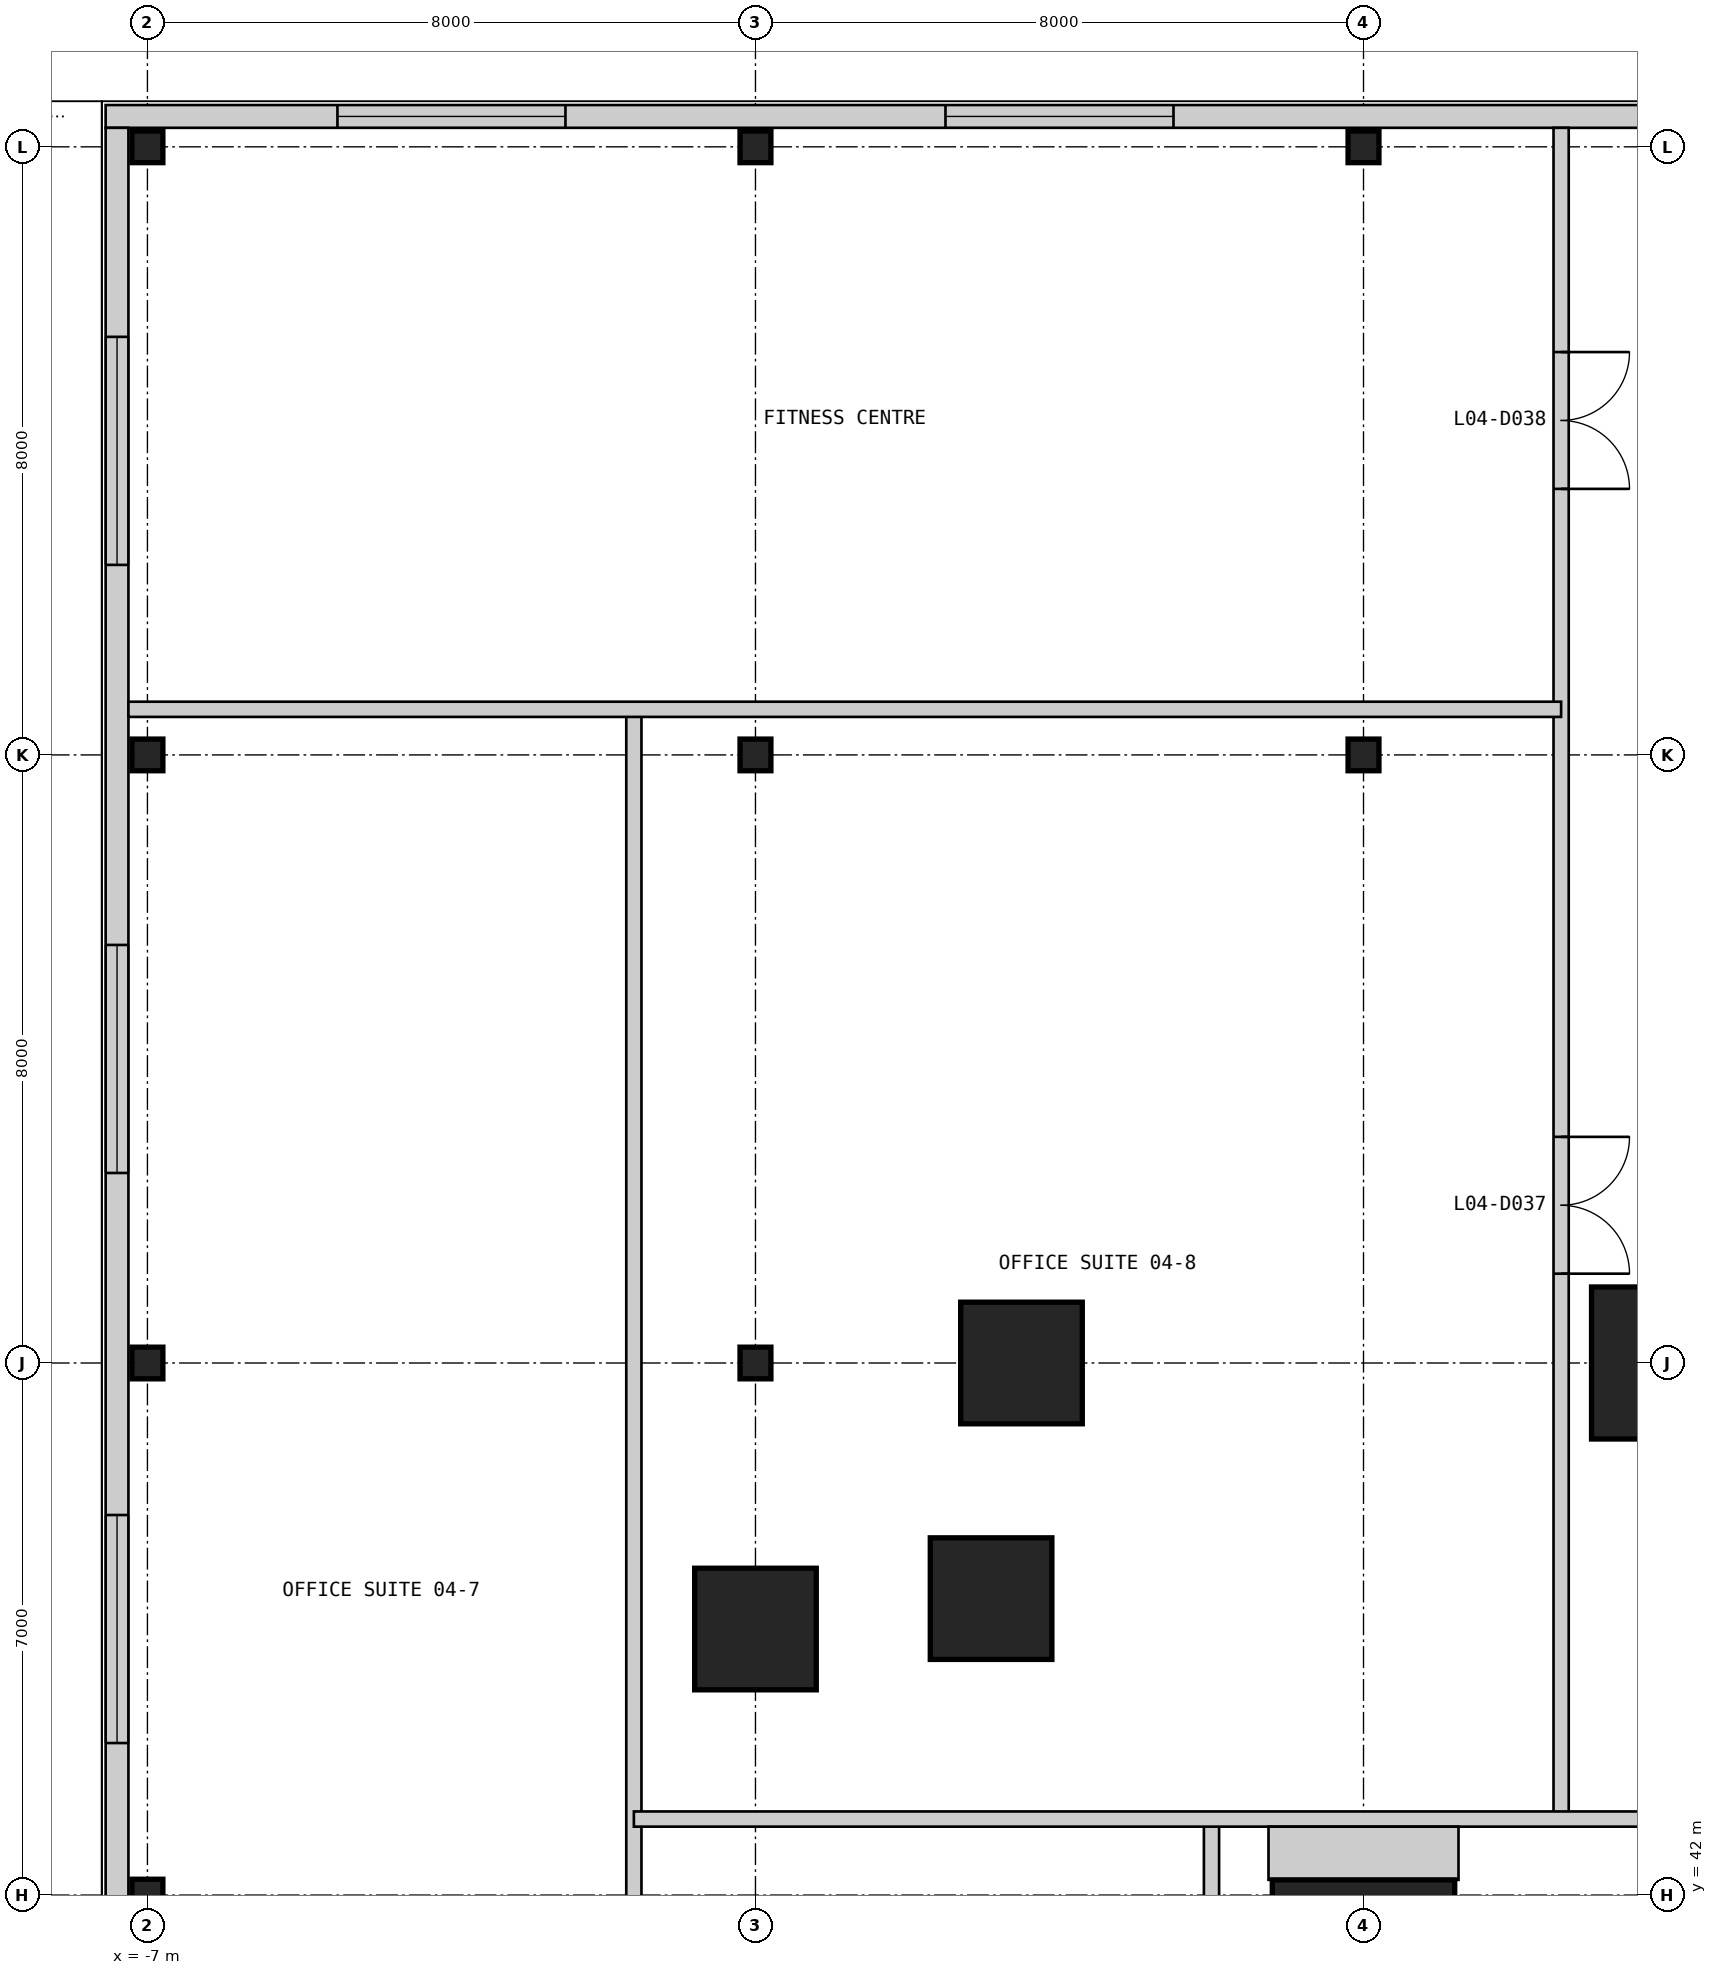
"""IFC4 building model, lengths in metres.
Left out: names, types, materials, properties, quantities, classifications, styles, units other than length and angle.
Written with IfcOpenShell. Run it as: python <this file> out.ifc"""

import sys

from ifc_helpers import new_model, si_unit, direction, frame, frame_2d, origin, origin_2d, place, context, subcontext, project, spatial, rectangle, i_section, extrude, element, fill, save


model = new_model("IFC4")
c1 = context("Model", 3, precision=1e-05, world=origin(), true_north=direction((0.0, 1.0)))
c2 = subcontext(c1, "Body", "Model", "MODEL_VIEW")
j1 = project(units=[si_unit("LENGTHUNIT", "METRE"), si_unit("PLANEANGLEUNIT", "RADIAN")], contexts=[c1])
p1 = place(None, origin())
s1 = spatial("IfcSite", under=j1, at=p1, CompositionType="ELEMENT")
p2 = place(p1, origin())
s2 = spatial("IfcBuilding", under=s1, at=p2, CompositionType="ELEMENT")
p3 = place(p2, frame((0.0, 0.0, 21.4)))
s3 = spatial("IfcBuildingStorey", under=s2, at=p3, CompositionType="ELEMENT", Elevation=21.4)
p4 = place(p3, frame((9.0, 41.0, 0.0), z_axis=(0.0, 0.0, 1.0), x_axis=(1.0, 0.0, 0.0)))
e1 = element("IfcColumn", 1, at=p4, inside=s3, PredefinedType="COLUMN", context=c2, shape_type="SweptSolid", body=[
    extrude(rectangle(XDim=2.4, YDim=2.4, at=origin_2d()), origin(), (0.0, 0.0, 1.0), 4.8),
])
p5 = place(p3, frame((13.0, 49.0, 0.0), z_axis=(0.0, 0.0, 1.0), x_axis=(1.0, 0.0, 0.0)))
e2 = element("IfcColumn", 2, at=p5, inside=s3, PredefinedType="COLUMN", context=c2, shape_type="SweptSolid", body=[
    extrude(rectangle(XDim=2.0, YDim=2.0, at=origin_2d()), origin(), (0.0, 0.0, 1.0), 4.8),
])
for number, where, z_axis, x_axis in (
    (3, (4.5, 49.0, 0.0), (0.0, 0.0, 1.0), (1.0, 0.0, 0.0)),
    (4, (4.1, 45.9, 0.0), (0.0, 0.0, 1.0), (1.0, 0.0, 0.0)),
    (5, (1.0, 45.5, 0.0), (0.0, 0.0, 1.0), (1.0, 0.0, 0.0)),
):
    element("IfcColumn", number, at=place(p3, frame(where, z_axis=z_axis, x_axis=x_axis)), inside=s3, PredefinedType="COLUMN", context=c2, shape_type="SweptSolid", body=[
        extrude(rectangle(XDim=1.6, YDim=1.6, at=origin_2d()), origin(), (0.0, 0.0, 1.0), 4.8),
    ])
for number, where, z_axis, x_axis in (
    (6, (-7.0, 42.0, 0.0), (0.0, 0.0, 1.0), (1.0, 0.0, 0.0)),
    (7, (-7.0, 49.0, 0.0), (0.0, 0.0, 1.0), (1.0, 0.0, 0.0)),
    (8, (-7.0, 57.0, 0.0), (0.0, 0.0, 1.0), (1.0, 0.0, 0.0)),
    (9, (-7.0, 65.0, 0.0), (0.0, 0.0, 1.0), (1.0, 0.0, 0.0)),
    (10, (1.0, 49.0, 0.0), (0.0, 0.0, 1.0), (1.0, 0.0, 0.0)),
    (11, (1.0, 57.0, 0.0), (0.0, 0.0, 1.0), (1.0, 0.0, 0.0)),
    (12, (1.0, 65.0, 0.0), (0.0, 0.0, 1.0), (1.0, 0.0, 0.0)),
    (13, (9.0, 57.0, 0.0), (0.0, 0.0, 1.0), (1.0, 0.0, 0.0)),
    (14, (9.0, 65.0, 0.0), (0.0, 0.0, 1.0), (1.0, 0.0, 0.0)),
):
    element("IfcColumn", number, at=place(p3, frame(where, z_axis=z_axis, x_axis=x_axis)), inside=s3, PredefinedType="COLUMN", context=c2, shape_type="SweptSolid", body=[
        extrude(i_section(OverallWidth=0.406, OverallDepth=0.417, WebThickness=0.03, FlangeThickness=0.048, at=origin_2d()), origin(), (0.0, 0.0, 1.0), 4.8),
    ])
p6 = place(p3, frame((57.55, 65.4, 0.0), z_axis=(0.0, 0.0, 1.0), x_axis=(-1.0, 0.0, 0.0)))
e15 = element("IfcWall", 15, at=p6, inside=s3, PredefinedType="SOLIDWALL", context=c2, shape_type="SweptSolid", body=[
    extrude(rectangle(XDim=65.1, YDim=0.3, at=frame_2d((32.55, 0.0))), origin(), (0.0, 0.0, 1.0), 4.5),
])
p7 = place(p6, frame((59.05, 0.0, 0.9)))
e16 = element("IfcOpeningElement", 16, at=p7, cuts=e15, PredefinedType="OPENING", context=c2, shape_type="SweptSolid", body=[
    extrude(rectangle(XDim=3.0, YDim=2.4, at=frame_2d((1.5, 1.2))), frame((0.0, 0.16, 0.0), z_axis=(0.0, -1.0, 0.0), x_axis=(1.0, 0.0, 0.0)), (0.0, 0.0, 1.0), 0.32),
])
p8 = place(p6, frame((51.05, 0.0, 0.9)))
e17 = element("IfcOpeningElement", 17, at=p8, cuts=e15, PredefinedType="OPENING", context=c2, shape_type="SweptSolid", body=[
    extrude(rectangle(XDim=3.0, YDim=2.4, at=frame_2d((1.5, 1.2))), frame((0.0, 0.16, 0.0), z_axis=(0.0, -1.0, 0.0), x_axis=(1.0, 0.0, 0.0)), (0.0, 0.0, 1.0), 0.32),
])
p9 = place(p6, frame((37.05, 0.0, 0.9)))
e18 = element("IfcOpeningElement", 18, at=p9, cuts=e15, PredefinedType="OPENING", context=c2, shape_type="SweptSolid", body=[
    extrude(rectangle(XDim=3.0, YDim=2.4, at=frame_2d((1.5, 1.2))), frame((0.0, 0.16, 0.0), z_axis=(0.0, -1.0, 0.0), x_axis=(1.0, 0.0, 0.0)), (0.0, 0.0, 1.0), 0.32),
])
p10 = place(p6, frame((25.05, 0.0, 0.9)))
e19 = element("IfcOpeningElement", 19, at=p10, cuts=e15, PredefinedType="OPENING", context=c2, shape_type="SweptSolid", body=[
    extrude(rectangle(XDim=3.0, YDim=2.4, at=frame_2d((1.5, 1.2))), frame((0.0, 0.16, 0.0), z_axis=(0.0, -1.0, 0.0), x_axis=(1.0, 0.0, 0.0)), (0.0, 0.0, 1.0), 0.32),
])
p11 = place(p6, frame((16.55, 0.0, 0.9)))
e20 = element("IfcOpeningElement", 20, at=p11, cuts=e15, PredefinedType="OPENING", context=c2, shape_type="SweptSolid", body=[
    extrude(rectangle(XDim=3.0, YDim=2.4, at=frame_2d((1.5, 1.2))), frame((0.0, 0.16, 0.0), z_axis=(0.0, -1.0, 0.0), x_axis=(1.0, 0.0, 0.0)), (0.0, 0.0, 1.0), 0.32),
])
p12 = place(p6, frame((10.55, 0.0, 0.9)))
e21 = element("IfcOpeningElement", 21, at=p12, cuts=e15, PredefinedType="OPENING", context=c2, shape_type="SweptSolid", body=[
    extrude(rectangle(XDim=3.0, YDim=2.4, at=frame_2d((1.5, 1.2))), frame((0.0, 0.16, 0.0), z_axis=(0.0, -1.0, 0.0), x_axis=(1.0, 0.0, 0.0)), (0.0, 0.0, 1.0), 0.32),
])
p13 = place(p6, frame((3.05, 0.0, 0.9)))
e22 = element("IfcOpeningElement", 22, at=p13, cuts=e15, PredefinedType="OPENING", context=c2, shape_type="SweptSolid", body=[
    extrude(rectangle(XDim=3.0, YDim=2.4, at=frame_2d((1.5, 1.2))), frame((0.0, 0.16, 0.0), z_axis=(0.0, -1.0, 0.0), x_axis=(1.0, 0.0, 0.0)), (0.0, 0.0, 1.0), 0.32),
])
p14 = place(p3, frame((-7.4, 65.25, 0.0), z_axis=(0.0, 0.0, 1.0), x_axis=(0.0, -1.0, 0.0)))
e23 = element("IfcWall", 23, at=p14, inside=s3, PredefinedType="SOLIDWALL", context=c2, shape_type="SweptSolid", body=[
    extrude(rectangle(XDim=72.5, YDim=0.3, at=frame_2d((36.25, 0.0))), origin(), (0.0, 0.0, 1.0), 4.5),
])
p15 = place(p14, frame((24.85, 0.0, 0.0)))
e24 = element("IfcOpeningElement", 24, at=p15, cuts=e23, PredefinedType="OPENING", context=c2, shape_type="SweptSolid", body=[
    extrude(rectangle(XDim=1.8, YDim=2.4, at=frame_2d((0.9, 1.2))), frame((0.0, 0.16, 0.0), z_axis=(0.0, -1.0, 0.0), x_axis=(1.0, 0.0, 0.0)), (0.0, 0.0, 1.0), 0.32),
])
p16 = place(p14, frame((59.85, 0.0, 0.0)))
e25 = element("IfcOpeningElement", 25, at=p16, cuts=e23, PredefinedType="OPENING", context=c2, shape_type="SweptSolid", body=[
    extrude(rectangle(XDim=1.8, YDim=2.4, at=frame_2d((0.9, 1.2))), frame((0.0, 0.16, 0.0), z_axis=(0.0, -1.0, 0.0), x_axis=(1.0, 0.0, 0.0)), (0.0, 0.0, 1.0), 0.32),
])
p17 = place(p14, frame((66.75, 0.0, 0.9)))
e26 = element("IfcOpeningElement", 26, at=p17, cuts=e23, PredefinedType="OPENING", context=c2, shape_type="SweptSolid", body=[
    extrude(rectangle(XDim=3.0, YDim=2.4, at=frame_2d((1.5, 1.2))), frame((0.0, 0.16, 0.0), z_axis=(0.0, -1.0, 0.0), x_axis=(1.0, 0.0, 0.0)), (0.0, 0.0, 1.0), 0.32),
])
p18 = place(p14, frame((44.75, 0.0, 0.9)))
e27 = element("IfcOpeningElement", 27, at=p18, cuts=e23, PredefinedType="OPENING", context=c2, shape_type="SweptSolid", body=[
    extrude(rectangle(XDim=3.0, YDim=2.4, at=frame_2d((1.5, 1.2))), frame((0.0, 0.16, 0.0), z_axis=(0.0, -1.0, 0.0), x_axis=(1.0, 0.0, 0.0)), (0.0, 0.0, 1.0), 0.32),
])
p19 = place(p14, frame((32.75, 0.0, 0.9)))
e28 = element("IfcOpeningElement", 28, at=p19, cuts=e23, PredefinedType="OPENING", context=c2, shape_type="SweptSolid", body=[
    extrude(rectangle(XDim=3.0, YDim=2.4, at=frame_2d((1.5, 1.2))), frame((0.0, 0.16, 0.0), z_axis=(0.0, -1.0, 0.0), x_axis=(1.0, 0.0, 0.0)), (0.0, 0.0, 1.0), 0.32),
])
p20 = place(p14, frame((18.25, 0.0, 0.9)))
e29 = element("IfcOpeningElement", 29, at=p20, cuts=e23, PredefinedType="OPENING", context=c2, shape_type="SweptSolid", body=[
    extrude(rectangle(XDim=3.0, YDim=2.4, at=frame_2d((1.5, 1.2))), frame((0.0, 0.16, 0.0), z_axis=(0.0, -1.0, 0.0), x_axis=(1.0, 0.0, 0.0)), (0.0, 0.0, 1.0), 0.32),
])
p21 = place(p14, frame((10.75, 0.0, 0.9)))
e30 = element("IfcOpeningElement", 30, at=p21, cuts=e23, PredefinedType="OPENING", context=c2, shape_type="SweptSolid", body=[
    extrude(rectangle(XDim=3.0, YDim=2.4, at=frame_2d((1.5, 1.2))), frame((0.0, 0.16, 0.0), z_axis=(0.0, -1.0, 0.0), x_axis=(1.0, 0.0, 0.0)), (0.0, 0.0, 1.0), 0.32),
])
p22 = place(p14, frame((2.75, 0.0, 0.9)))
e31 = element("IfcOpeningElement", 31, at=p22, cuts=e23, PredefinedType="OPENING", context=c2, shape_type="SweptSolid", body=[
    extrude(rectangle(XDim=3.0, YDim=2.4, at=frame_2d((1.5, 1.2))), frame((0.0, 0.16, 0.0), z_axis=(0.0, -1.0, 0.0), x_axis=(1.0, 0.0, 0.0)), (0.0, 0.0, 1.0), 0.32),
])
p23 = place(p3, frame((-0.6, 34.4, 0.0), z_axis=(0.0, 0.0, 1.0), x_axis=(0.0, 1.0, 0.0)))
e32 = element("IfcWall", 32, at=p23, inside=s3, PredefinedType="PARTITIONING", context=c2, shape_type="SweptSolid", body=[
    extrude(rectangle(XDim=23.2, YDim=0.2, at=frame_2d((11.6, 0.0))), origin(), (0.0, 0.0, 1.0), 4.5),
])
p24 = place(p3, frame((7.0, 15.0, 0.0), z_axis=(0.0, 0.0, 1.0), x_axis=(0.0, 1.0, 0.0)))
e33 = element("IfcWall", 33, at=p24, inside=s3, PredefinedType="PARTITIONING", context=c2, shape_type="SweptSolid", body=[
    extrude(rectangle(XDim=28.0, YDim=0.2, at=frame_2d((14.0, 0.0))), origin(), (0.0, 0.0, 1.0), 3.843),
])
p25 = place(p3, frame((11.6, 43.0, 0.0), z_axis=(0.0, 0.0, 1.0), x_axis=(0.0, 1.0, 0.0)))
e34 = element("IfcWall", 34, at=p25, inside=s3, PredefinedType="PARTITIONING", context=c2, shape_type="SweptSolid", body=[
    extrude(rectangle(XDim=22.25, YDim=0.2, at=frame_2d((11.125, 0.0))), origin(), (0.0, 0.0, 1.0), 4.5),
])
p26 = place(p25, frame((7.175, 0.0, 0.0)))
e35 = element("IfcOpeningElement", 35, at=p26, cuts=e34, PredefinedType="OPENING", context=c2, shape_type="SweptSolid", body=[
    extrude(rectangle(XDim=1.8, YDim=2.4, at=frame_2d((0.9, 1.2))), frame((0.0, 0.11, 0.0), z_axis=(0.0, -1.0, 0.0), x_axis=(1.0, 0.0, 0.0)), (0.0, 0.0, 1.0), 0.22),
])
p27 = place(p25, frame((17.5, 0.0, 0.0)))
e36 = element("IfcOpeningElement", 36, at=p27, cuts=e34, PredefinedType="OPENING", context=c2, shape_type="SweptSolid", body=[
    extrude(rectangle(XDim=1.8, YDim=2.4, at=frame_2d((0.9, 1.2))), frame((0.0, 0.11, 0.0), z_axis=(0.0, -1.0, 0.0), x_axis=(1.0, 0.0, 0.0)), (0.0, 0.0, 1.0), 0.22),
])
p28 = place(p3, frame((-0.6, 43.0, 0.0), z_axis=(0.0, 0.0, 1.0), x_axis=(1.0, 0.0, 0.0)))
e37 = element("IfcWall", 37, at=p28, inside=s3, PredefinedType="PARTITIONING", context=c2, shape_type="SweptSolid", body=[
    extrude(rectangle(XDim=14.6, YDim=0.2, at=frame_2d((7.3, 0.0))), origin(), (0.0, 0.0, 1.0), 4.5),
])
p29 = place(p3, frame((-7.25, 57.6, 0.0), z_axis=(0.0, 0.0, 1.0), x_axis=(1.0, 0.0, 0.0)))
e38 = element("IfcWall", 38, at=p29, inside=s3, PredefinedType="PARTITIONING", context=c2, shape_type="SweptSolid", body=[
    extrude(rectangle(XDim=18.85, YDim=0.2, at=frame_2d((9.425, 0.0))), origin(), (0.0, 0.0, 1.0), 4.5),
])
p30 = place(p3, frame((9.0, 42.9, 0.0), z_axis=(0.0, 0.0, 1.0), x_axis=(0.0, -1.0, 0.0)))
e39 = element("IfcWall", 39, at=p30, inside=s3, PredefinedType="PARTITIONING", context=c2, shape_type="SweptSolid", body=[
    extrude(rectangle(XDim=0.7, YDim=2.5, at=frame_2d((0.35, 0.0))), origin(), (0.0, 0.0, 1.0), 4.5),
])
p31 = place(p7, origin())
e40 = element("IfcWindow", 40, at=p31, inside=s3, PartitioningType="SINGLE_PANEL", PredefinedType="WINDOW", context=c2, shape_type="SweptSolid", body=[
    extrude(rectangle(XDim=3.0, YDim=2.4, at=frame_2d((1.5, 1.2))), frame((0.0, 0.03, 0.0), z_axis=(0.0, -1.0, 0.0), x_axis=(1.0, 0.0, 0.0)), (0.0, 0.0, 1.0), 0.06),
])
fill(e16, e40)
p32 = place(p8, origin())
e41 = element("IfcWindow", 41, at=p32, inside=s3, PartitioningType="SINGLE_PANEL", PredefinedType="WINDOW", context=c2, shape_type="SweptSolid", body=[
    extrude(rectangle(XDim=3.0, YDim=2.4, at=frame_2d((1.5, 1.2))), frame((0.0, 0.03, 0.0), z_axis=(0.0, -1.0, 0.0), x_axis=(1.0, 0.0, 0.0)), (0.0, 0.0, 1.0), 0.06),
])
fill(e17, e41)
p33 = place(p20, origin())
e42 = element("IfcWindow", 42, at=p33, inside=s3, PartitioningType="SINGLE_PANEL", PredefinedType="WINDOW", context=c2, shape_type="SweptSolid", body=[
    extrude(rectangle(XDim=3.0, YDim=2.4, at=frame_2d((1.5, 1.2))), frame((0.0, 0.03, 0.0), z_axis=(0.0, -1.0, 0.0), x_axis=(1.0, 0.0, 0.0)), (0.0, 0.0, 1.0), 0.06),
])
fill(e29, e42)
p34 = place(p21, origin())
e43 = element("IfcWindow", 43, at=p34, inside=s3, PartitioningType="SINGLE_PANEL", PredefinedType="WINDOW", context=c2, shape_type="SweptSolid", body=[
    extrude(rectangle(XDim=3.0, YDim=2.4, at=frame_2d((1.5, 1.2))), frame((0.0, 0.03, 0.0), z_axis=(0.0, -1.0, 0.0), x_axis=(1.0, 0.0, 0.0)), (0.0, 0.0, 1.0), 0.06),
])
fill(e30, e43)
p35 = place(p22, origin())
e44 = element("IfcWindow", 44, at=p35, inside=s3, PartitioningType="SINGLE_PANEL", PredefinedType="WINDOW", context=c2, shape_type="SweptSolid", body=[
    extrude(rectangle(XDim=3.0, YDim=2.4, at=frame_2d((1.5, 1.2))), frame((0.0, 0.03, 0.0), z_axis=(0.0, -1.0, 0.0), x_axis=(1.0, 0.0, 0.0)), (0.0, 0.0, 1.0), 0.06),
])
fill(e31, e44)
p36 = place(p26, frame((1.8, 0.0, 0.0), z_axis=(0.0, 0.0, 1.0), x_axis=(-1.0, 0.0, 0.0)))
e45 = element("IfcDoor", 45, at=p36, inside=s3, OperationType="DOUBLE_DOOR_SINGLE_SWING", PredefinedType="DOOR", context=c2, shape_type="SweptSolid", body=[
    extrude(rectangle(XDim=1.8, YDim=2.4, at=frame_2d((0.9, 1.2))), frame((0.0, 0.025, 0.0), z_axis=(0.0, -1.0, 0.0), x_axis=(1.0, 0.0, 0.0)), (0.0, 0.0, 1.0), 0.05),
])
fill(e35, e45)
p37 = place(p27, frame((1.8, 0.0, 0.0), z_axis=(0.0, 0.0, 1.0), x_axis=(-1.0, 0.0, 0.0)))
e46 = element("IfcDoor", 46, at=p37, inside=s3, OperationType="DOUBLE_DOOR_SINGLE_SWING", PredefinedType="DOOR", context=c2, shape_type="SweptSolid", body=[
    extrude(rectangle(XDim=1.8, YDim=2.4, at=frame_2d((0.9, 1.2))), frame((0.0, 0.025, 0.0), z_axis=(0.0, -1.0, 0.0), x_axis=(1.0, 0.0, 0.0)), (0.0, 0.0, 1.0), 0.05),
])
fill(e36, e46)
save(model, sys.argv[1])
